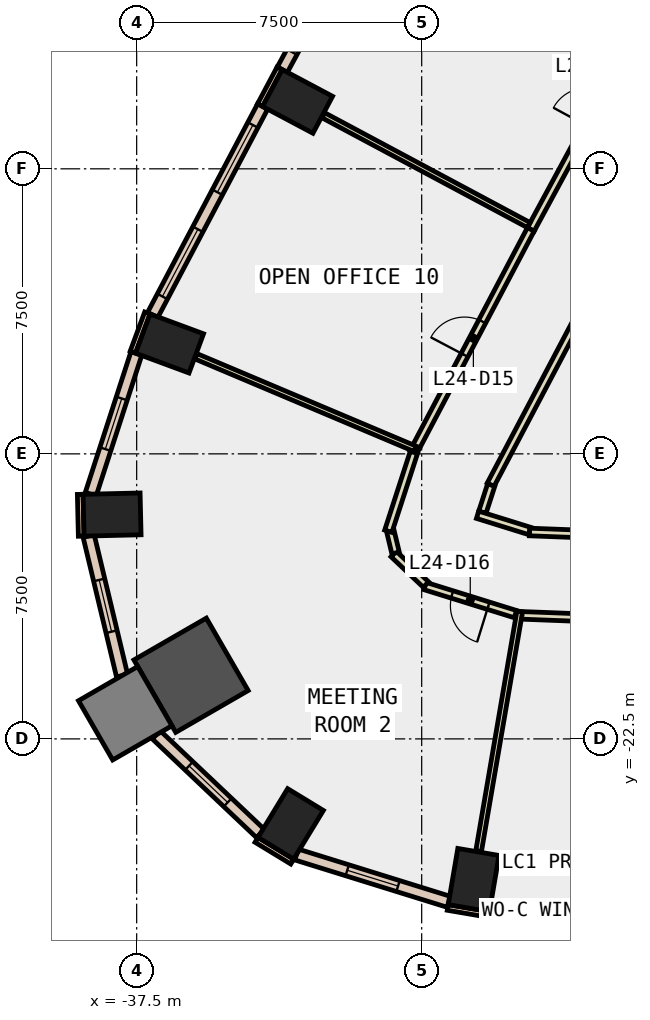
"""IFC4 building model, lengths in metres.
Left out: names, types, materials, properties, quantities, classifications, styles, units other than length and angle.
Written with IfcOpenShell. Run it as: python <this file> out.ifc"""

import sys

from ifc_helpers import new_model, si_unit, direction, frame, frame_2d, origin, origin_2d, place, context, subcontext, project, spatial, rectangle, extrude, element, fill, save


model = new_model("IFC4")
c1 = context("Model", 3, precision=1e-05, world=origin(), true_north=direction((0.0, 1.0)))
c2 = subcontext(c1, "Body", "Model", "MODEL_VIEW")
j1 = project(units=[si_unit("LENGTHUNIT", "METRE"), si_unit("PLANEANGLEUNIT", "RADIAN")], contexts=[c1])
p1 = place(None, origin())
s1 = spatial("IfcSite", under=j1, at=p1, CompositionType="ELEMENT")
p2 = place(p1, origin())
s2 = spatial("IfcBuilding", under=s1, at=p2, CompositionType="ELEMENT")
p3 = place(p2, frame((0.0, 0.0, 111.8)))
s3 = spatial("IfcBuildingStorey", under=s2, at=p3, CompositionType="ELEMENT", Elevation=111.8)
for number, where, z_axis, x_axis in (
    (1, (-28.633, -26.214, -0.4), (0.0, 0.0, 1.0), (-0.986, 0.168, 0.0)),
    (2, (-33.266, -5.726, -0.4), (0.0, 0.0, 1.0), (0.469, 0.883, 0.0)),
    (3, (-36.635, -12.096, -0.4), (0.0, 0.0, 1.0), (0.347, 0.938, 0.0)),
    (4, (-38.147, -16.597, -0.4), (0.0, 0.0, 1.0), (-0.023, 1.0, 0.0)),
):
    element("IfcColumn", number, at=place(p3, frame(where, z_axis=z_axis, x_axis=x_axis)), inside=s3, PredefinedType="COLUMN", context=c2, shape_type="SweptSolid", body=[
        extrude(rectangle(XDim=1.1, YDim=1.5, at=origin_2d()), origin(), (0.0, 0.0, 1.0), 4.2),
    ])
p4 = place(p3, frame((-36.069, -20.825, -0.4), z_axis=(0.0, 0.0, 1.0), x_axis=(0.866025403784, 0.5, 0.0)))
e5 = element("IfcColumn", 5, at=p4, inside=s3, PredefinedType="COLUMN", context=c2, shape_type="SweptSolid", body=[
    extrude(rectangle(XDim=2.2, YDim=2.2, at=origin_2d()), origin(), (0.0, 0.0, 1.0), 4.2),
])
p5 = place(p3, frame((-33.447, -24.737, -0.4), z_axis=(0.0, 0.0, 1.0), x_axis=(-0.854095929175, 0.520115510024, 0.0)))
e6 = element("IfcColumn", 6, at=p5, inside=s3, PredefinedType="COLUMN", context=c2, shape_type="SweptSolid", body=[
    extrude(rectangle(XDim=1.1, YDim=1.5, at=origin_2d()), origin(), (0.0, 0.0, 1.0), 4.2),
])
p6 = place(p3, frame((-37.801, -21.825, -0.4), z_axis=(0.0, 0.0, 1.0), x_axis=(0.866025403784, 0.5, 0.0)))
e7 = element("IfcColumn", 7, at=p6, inside=s3, PredefinedType="COLUMN", context=c2, shape_type="SweptSolid", body=[
    extrude(rectangle(XDim=1.8, YDim=1.8, at=origin_2d()), origin(), (0.0, 0.0, 1.0), 4.2),
])
p7 = place(p3, frame((-33.737, -4.854, 0.0), z_axis=(0.0, 0.0, 1.0), x_axis=(-0.46919310775, -0.883095593716, 0.0)))
e8 = element("IfcWall", 8, at=p7, inside=s3, PredefinedType="STANDARD", context=c2, shape_type="SweptSolid", body=[
    extrude(rectangle(XDim=1.099, YDim=0.15, at=frame_2d((0.55, 0.0))), origin(), (0.0, 0.0, 1.0), 3.8),
])
p8 = place(p3, frame((-37.218, -11.293, 0.0), z_axis=(0.0, 0.0, 1.0), x_axis=(-0.347205967468, -0.937788897436, 0.0)))
e9 = element("IfcWall", 9, at=p8, inside=s3, PredefinedType="STANDARD", context=c2, shape_type="SweptSolid", body=[
    extrude(rectangle(XDim=1.1, YDim=0.15, at=frame_2d((0.55, 0.0))), origin(), (0.0, 0.0, 1.0), 3.8),
])
p9 = place(p3, frame((-29.314, -26.935, 0.0), z_axis=(0.0, 0.0, 1.0), x_axis=(0.985763338892, -0.168138751323, 0.0)))
e10 = element("IfcWall", 10, at=p9, inside=s3, PredefinedType="STANDARD", context=c2, shape_type="SweptSolid", body=[
    extrude(rectangle(XDim=1.101, YDim=0.15, at=frame_2d((0.55, 0.0))), origin(), (0.0, 0.0, 1.0), 3.8),
])
for number, where, z_axis, x_axis in (
    (11, (-38.985, -16.066, 0.0), (0.0, 0.0, 1.0), (0.024, -1.0, 0.0)),
    (12, (-34.346, -25.156, 0.0), (0.0, 0.0, 1.0), (0.854, -0.52, 0.0)),
):
    element("IfcWall", number, at=place(p3, frame(where, z_axis=z_axis, x_axis=x_axis)), inside=s3, PredefinedType="STANDARD", context=c2, shape_type="SweptSolid", body=[
        extrude(rectangle(XDim=1.1, YDim=0.15, at=frame_2d((0.55, 0.0))), origin(), (0.0, 0.0, 1.0), 3.8),
    ])
p10 = place(p3, frame((-28.205, -26.973, 0.0), z_axis=(0.0, 0.0, 1.0), x_axis=(0.999266319694, -0.03829911651, 0.0)))
e13 = element("IfcWall", 13, at=p10, inside=s3, PredefinedType="STANDARD", context=c2, shape_type="SweptSolid", body=[
    extrude(rectangle(XDim=5.877, YDim=0.3, at=frame_2d((2.939, 0.0))), origin(), (0.0, 0.0, 1.0), 3.8),
])
p11 = place(p10, frame((0.469, 0.0, 0.9)))
e14 = element("IfcOpeningElement", 14, at=p11, cuts=e13, PredefinedType="OPENING", context=c2, shape_type="SweptSolid", body=[
    extrude(rectangle(XDim=2.0, YDim=2.6, at=frame_2d((1.0, 1.3))), frame((0.0, 0.16, 0.0), z_axis=(0.0, -1.0, 0.0), x_axis=(1.0, 0.0, 0.0)), (0.0, 0.0, 1.0), 0.32),
])
p12 = place(p10, frame((3.408, 0.0, 0.9)))
e15 = element("IfcOpeningElement", 15, at=p12, cuts=e13, PredefinedType="OPENING", context=c2, shape_type="SweptSolid", body=[
    extrude(rectangle(XDim=2.0, YDim=2.6, at=frame_2d((1.0, 1.3))), frame((0.0, 0.16, 0.0), z_axis=(0.0, -1.0, 0.0), x_axis=(1.0, 0.0, 0.0)), (0.0, 0.0, 1.0), 0.32),
])
p13 = place(p3, frame((-30.758, 0.481, 0.0), z_axis=(0.0, 0.0, 1.0), x_axis=(-0.476097776444, -0.879392351152, 0.0)))
e16 = element("IfcWall", 16, at=p13, inside=s3, PredefinedType="STANDARD", context=c2, shape_type="SweptSolid", body=[
    extrude(rectangle(XDim=6.11, YDim=0.3, at=frame_2d((3.055, 0.0))), origin(), (0.0, 0.0, 1.0), 3.8),
])
p14 = place(p13, frame((0.527, 0.0, 0.9)))
e17 = element("IfcOpeningElement", 17, at=p14, cuts=e16, PredefinedType="OPENING", context=c2, shape_type="SweptSolid", body=[
    extrude(rectangle(XDim=2.0, YDim=2.6, at=frame_2d((1.0, 1.3))), frame((0.0, 0.16, 0.0), z_axis=(0.0, -1.0, 0.0), x_axis=(1.0, 0.0, 0.0)), (0.0, 0.0, 1.0), 0.32),
])
p15 = place(p13, frame((3.582, 0.0, 0.9)))
e18 = element("IfcOpeningElement", 18, at=p15, cuts=e16, PredefinedType="OPENING", context=c2, shape_type="SweptSolid", body=[
    extrude(rectangle(XDim=2.0, YDim=2.6, at=frame_2d((1.0, 1.3))), frame((0.0, 0.16, 0.0), z_axis=(0.0, -1.0, 0.0), x_axis=(1.0, 0.0, 0.0)), (0.0, 0.0, 1.0), 0.32),
])
p16 = place(p3, frame((-34.185, -5.86, 0.0), z_axis=(0.0, 0.0, 1.0), x_axis=(-0.466599547852, -0.88446868907, 0.0)))
e19 = element("IfcWall", 19, at=p16, inside=s3, PredefinedType="STANDARD", context=c2, shape_type="SweptSolid", body=[
    extrude(rectangle(XDim=6.202, YDim=0.3, at=frame_2d((3.101, 0.0))), origin(), (0.0, 0.0, 1.0), 3.8),
])
p17 = place(p16, frame((0.551, 0.0, 0.9)))
e20 = element("IfcOpeningElement", 20, at=p17, cuts=e19, PredefinedType="OPENING", context=c2, shape_type="SweptSolid", body=[
    extrude(rectangle(XDim=2.0, YDim=2.6, at=frame_2d((1.0, 1.3))), frame((0.0, 0.16, 0.0), z_axis=(0.0, -1.0, 0.0), x_axis=(1.0, 0.0, 0.0)), (0.0, 0.0, 1.0), 0.32),
])
p18 = place(p16, frame((3.652, 0.0, 0.9)))
e21 = element("IfcOpeningElement", 21, at=p18, cuts=e19, PredefinedType="OPENING", context=c2, shape_type="SweptSolid", body=[
    extrude(rectangle(XDim=2.0, YDim=2.6, at=frame_2d((1.0, 1.3))), frame((0.0, 0.16, 0.0), z_axis=(0.0, -1.0, 0.0), x_axis=(1.0, 0.0, 0.0)), (0.0, 0.0, 1.0), 0.32),
])
p19 = place(p3, frame((-37.508, -12.358, 0.0), z_axis=(0.0, 0.0, 1.0), x_axis=(-0.308484760821, -0.951229284842, 0.0)))
e22 = element("IfcWall", 22, at=p19, inside=s3, PredefinedType="STANDARD", context=c2, shape_type="SweptSolid", body=[
    extrude(rectangle(XDim=3.893, YDim=0.3, at=frame_2d((1.947, 0.0))), origin(), (0.0, 0.0, 1.0), 3.8),
])
p20 = place(p19, frame((1.246, 0.0, 0.9)))
e23 = element("IfcOpeningElement", 23, at=p20, cuts=e22, PredefinedType="OPENING", context=c2, shape_type="SweptSolid", body=[
    extrude(rectangle(XDim=1.4, YDim=2.6, at=frame_2d((0.7, 1.3))), frame((0.0, 0.16, 0.0), z_axis=(0.0, -1.0, 0.0), x_axis=(1.0, 0.0, 0.0)), (0.0, 0.0, 1.0), 0.32),
])
p21 = place(p3, frame((-38.763, -17.161, 0.0), z_axis=(0.0, 0.0, 1.0), x_axis=(0.232654276823, -0.972559503309, 0.0)))
e24 = element("IfcWall", 24, at=p21, inside=s3, PredefinedType="STANDARD", context=c2, shape_type="SweptSolid", body=[
    extrude(rectangle(XDim=3.778, YDim=0.3, at=frame_2d((1.889, 0.0))), origin(), (0.0, 0.0, 1.0), 3.8),
])
p22 = place(p21, frame((1.189, 0.0, 0.9)))
e25 = element("IfcOpeningElement", 25, at=p22, cuts=e24, PredefinedType="OPENING", context=c2, shape_type="SweptSolid", body=[
    extrude(rectangle(XDim=1.4, YDim=2.6, at=frame_2d((0.7, 1.3))), frame((0.0, 0.16, 0.0), z_axis=(0.0, -1.0, 0.0), x_axis=(1.0, 0.0, 0.0)), (0.0, 0.0, 1.0), 0.32),
])
p23 = place(p3, frame((-36.985, -22.392, 0.0), z_axis=(0.0, 0.0, 1.0), x_axis=(0.726076674532, -0.687613745281, 0.0)))
e26 = element("IfcWall", 26, at=p23, inside=s3, PredefinedType="STANDARD", context=c2, shape_type="SweptSolid", body=[
    extrude(rectangle(XDim=3.777, YDim=0.3, at=frame_2d((1.888, 0.0))), origin(), (0.0, 0.0, 1.0), 3.8),
])
p24 = place(p23, frame((1.188, 0.0, 0.9)))
e27 = element("IfcOpeningElement", 27, at=p24, cuts=e26, PredefinedType="OPENING", context=c2, shape_type="SweptSolid", body=[
    extrude(rectangle(XDim=1.4, YDim=2.6, at=frame_2d((0.7, 1.3))), frame((0.0, 0.16, 0.0), z_axis=(0.0, -1.0, 0.0), x_axis=(1.0, 0.0, 0.0)), (0.0, 0.0, 1.0), 0.32),
])
p25 = place(p3, frame((-33.294, -25.542, 0.0), z_axis=(0.0, 0.0, 1.0), x_axis=(0.954955020021, -0.296750585066, 0.0)))
e28 = element("IfcWall", 28, at=p25, inside=s3, PredefinedType="STANDARD", context=c2, shape_type="SweptSolid", body=[
    extrude(rectangle(XDim=4.196, YDim=0.3, at=frame_2d((2.098, 0.0))), origin(), (0.0, 0.0, 1.0), 3.8),
])
p26 = place(p25, frame((1.398, 0.0, 0.9)))
e29 = element("IfcOpeningElement", 29, at=p26, cuts=e28, PredefinedType="OPENING", context=c2, shape_type="SweptSolid", body=[
    extrude(rectangle(XDim=1.4, YDim=2.6, at=frame_2d((0.7, 1.3))), frame((0.0, 0.16, 0.0), z_axis=(0.0, -1.0, 0.0), x_axis=(1.0, 0.0, 0.0)), (0.0, 0.0, 1.0), 0.32),
])
p27 = place(p3, frame((-25.153, -10.065, 0.0), z_axis=(0.0, 0.0, 1.0), x_axis=(-0.466663976618, -0.884434696813, 0.0)))
e30 = element("IfcWall", 30, at=p27, inside=s3, PredefinedType="PARTITIONING", context=c2, shape_type="SweptSolid", body=[
    extrude(rectangle(XDim=6.501, YDim=0.2, at=frame_2d((3.25, 0.0))), origin(), (0.0, 0.0, 1.0), 3.8),
])
p28 = place(p3, frame((-28.171, -15.821, 0.0), z_axis=(0.0, 0.0, 1.0), x_axis=(-0.308053137273, -0.951369152651, 0.0)))
e31 = element("IfcWall", 31, at=p28, inside=s3, PredefinedType="PARTITIONING", context=c2, shape_type="SweptSolid", body=[
    extrude(rectangle(XDim=0.754, YDim=0.2, at=frame_2d((0.377, 0.0))), origin(), (0.0, 0.0, 1.0), 3.8),
])
p29 = place(p3, frame((-28.529, -16.603, 0.0), z_axis=(0.0, 0.0, 1.0), x_axis=(0.954829998701, -0.297152609916, 0.0)))
e32 = element("IfcWall", 32, at=p29, inside=s3, PredefinedType="PARTITIONING", context=c2, shape_type="SweptSolid", body=[
    extrude(rectangle(XDim=1.437, YDim=0.2, at=frame_2d((0.719, 0.0))), origin(), (0.0, 0.0, 1.0), 3.8),
])
p30 = place(p3, frame((-27.162, -17.056, 0.0), z_axis=(0.0, 0.0, 1.0), x_axis=(0.999270868304, -0.038180253525, 0.0)))
e33 = element("IfcWall", 33, at=p30, inside=s3, PredefinedType="PARTITIONING", context=c2, shape_type="SweptSolid", body=[
    extrude(rectangle(XDim=5.71, YDim=0.2, at=frame_2d((2.855, 0.0))), origin(), (0.0, 0.0, 1.0), 3.8),
])
p31 = place(p3, frame((-27.129, -9.094, 0.0), z_axis=(0.0, 0.0, 1.0), x_axis=(0.476090835435, 0.879396108938, 0.0)))
e34 = element("IfcWall", 34, at=p31, inside=s3, PredefinedType="PARTITIONING", context=c2, shape_type="SweptSolid", body=[
    extrude(rectangle(XDim=7.198, YDim=0.2, at=frame_2d((3.599, 0.0))), origin(), (0.0, 0.0, 1.0), 3.8),
])
p32 = place(p31, frame((3.099, 0.0, 0.0)))
e35 = element("IfcOpeningElement", 35, at=p32, cuts=e34, PredefinedType="OPENING", context=c2, shape_type="SweptSolid", body=[
    extrude(rectangle(XDim=1.0, YDim=2.1, at=frame_2d((0.5, 1.05))), frame((0.0, 0.11, 0.0), z_axis=(0.0, -1.0, 0.0), x_axis=(1.0, 0.0, 0.0)), (0.0, 0.0, 1.0), 0.22),
])
p33 = place(p3, frame((-30.221, -14.956, 0.0), z_axis=(0.0, 0.0, 1.0), x_axis=(0.466543318111, 0.884498350663, 0.0)))
e36 = element("IfcWall", 36, at=p33, inside=s3, PredefinedType="PARTITIONING", context=c2, shape_type="SweptSolid", body=[
    extrude(rectangle(XDim=6.627, YDim=0.2, at=frame_2d((3.314, 0.0))), origin(), (0.0, 0.0, 1.0), 3.8),
])
p34 = place(p33, frame((2.889, 0.0, 0.0)))
e37 = element("IfcOpeningElement", 37, at=p34, cuts=e36, PredefinedType="OPENING", context=c2, shape_type="SweptSolid", body=[
    extrude(rectangle(XDim=1.0, YDim=2.1, at=frame_2d((0.5, 1.05))), frame((0.0, 0.11, 0.0), z_axis=(0.0, -1.0, 0.0), x_axis=(1.0, 0.0, 0.0)), (0.0, 0.0, 1.0), 0.22),
])
p35 = place(p3, frame((-27.533, -19.217, 0.0), z_axis=(0.0, 0.0, 1.0), x_axis=(-0.954946345159, 0.296778499671, 0.0)))
e38 = element("IfcWall", 38, at=p35, inside=s3, PredefinedType="PARTITIONING", context=c2, shape_type="SweptSolid", body=[
    extrude(rectangle(XDim=2.49, YDim=0.2, at=frame_2d((1.245, 0.0))), origin(), (0.0, 0.0, 1.0), 3.8),
])
p36 = place(p35, frame((0.745, 0.0, 0.0)))
e39 = element("IfcOpeningElement", 39, at=p36, cuts=e38, PredefinedType="OPENING", context=c2, shape_type="SweptSolid", body=[
    extrude(rectangle(XDim=1.0, YDim=2.1, at=frame_2d((0.5, 1.05))), frame((0.0, 0.11, 0.0), z_axis=(0.0, -1.0, 0.0), x_axis=(1.0, 0.0, 0.0)), (0.0, 0.0, 1.0), 0.22),
])
p37 = place(p3, frame((-29.888, -18.439, 0.0), z_axis=(0.0, 0.0, 1.0), x_axis=(-0.726155646563, 0.687530346214, 0.0)))
e40 = element("IfcWall", 40, at=p37, inside=s3, PredefinedType="PARTITIONING", context=c2, shape_type="SweptSolid", body=[
    extrude(rectangle(XDim=1.169, YDim=0.2, at=frame_2d((0.585, 0.0))), origin(), (0.0, 0.0, 1.0), 3.8),
])
p38 = place(p3, frame((-30.687, -17.607, 0.0), z_axis=(0.0, 0.0, 1.0), x_axis=(-0.232504544059, 0.972595309978, 0.0)))
e41 = element("IfcWall", 41, at=p38, inside=s3, PredefinedType="PARTITIONING", context=c2, shape_type="SweptSolid", body=[
    extrude(rectangle(XDim=0.585, YDim=0.2, at=frame_2d((0.292, 0.0))), origin(), (0.0, 0.0, 1.0), 3.8),
])
p39 = place(p3, frame((-30.878, -17.036, 0.0), z_axis=(0.0, 0.0, 1.0), x_axis=(0.308592319841, 0.951194396606, 0.0)))
e42 = element("IfcWall", 42, at=p39, inside=s3, PredefinedType="PARTITIONING", context=c2, shape_type="SweptSolid", body=[
    extrude(rectangle(XDim=2.18, YDim=0.2, at=frame_2d((1.09, 0.0))), origin(), (0.0, 0.0, 1.0), 3.8),
])
p40 = place(p3, frame((-21.529, -19.473, 0.0), z_axis=(0.0, 0.0, 1.0), x_axis=(-0.999270076349, 0.038200975307, 0.0)))
e43 = element("IfcWall", 43, at=p40, inside=s3, PredefinedType="PARTITIONING", context=c2, shape_type="SweptSolid", body=[
    extrude(rectangle(XDim=5.937, YDim=0.2, at=frame_2d((2.969, 0.0))), origin(), (0.0, 0.0, 1.0), 3.8),
])
p41 = place(p40, frame((2.469, 0.0, 0.0)))
e44 = element("IfcOpeningElement", 44, at=p41, cuts=e43, PredefinedType="OPENING", context=c2, shape_type="SweptSolid", body=[
    extrude(rectangle(XDim=1.0, YDim=2.1, at=frame_2d((0.5, 1.05))), frame((0.0, 0.11, 0.0), z_axis=(0.0, -1.0, 0.0), x_axis=(1.0, 0.0, 0.0)), (0.0, 0.0, 1.0), 0.22),
])
p42 = place(p3, frame((-27.182, -8.981, 0.0), z_axis=(0.0, 0.0, 1.0), x_axis=(-0.881899408669, 0.471437623647, 0.0)))
e45 = element("IfcWall", 45, at=p42, inside=s3, PredefinedType="PARTITIONING", context=c2, shape_type="SweptSolid", body=[
    extrude(rectangle(XDim=6.13, YDim=0.15, at=frame_2d((3.065, 0.0))), origin(), (0.0, 0.0, 1.0), 3.8),
])
p43 = place(p3, frame((-30.174, -14.867, 0.0), z_axis=(0.0, 0.0, 1.0), x_axis=(-0.921262609517, 0.388941132185, 0.0)))
e46 = element("IfcWall", 46, at=p43, inside=s3, PredefinedType="PARTITIONING", context=c2, shape_type="SweptSolid", body=[
    extrude(rectangle(XDim=6.258, YDim=0.15, at=frame_2d((3.129, 0.0))), origin(), (0.0, 0.0, 1.0), 3.8),
])
p44 = place(p3, frame((-27.42, -19.148, 0.0), z_axis=(0.0, 0.0, 1.0), x_axis=(-0.169086648341, -0.985601189809, 0.0)))
e47 = element("IfcWall", 47, at=p44, inside=s3, PredefinedType="PARTITIONING", context=c2, shape_type="SweptSolid", body=[
    extrude(rectangle(XDim=6.399, YDim=0.15, at=frame_2d((3.2, 0.0))), origin(), (0.0, 0.0, 1.0), 3.8),
])
p45 = place(p11, origin())
e48 = element("IfcWindow", 48, at=p45, inside=s3, PartitioningType="SINGLE_PANEL", PredefinedType="WINDOW", context=c2, shape_type="SweptSolid", body=[
    extrude(rectangle(XDim=2.0, YDim=2.6, at=frame_2d((1.0, 1.3))), frame((0.0, 0.03, 0.0), z_axis=(0.0, -1.0, 0.0), x_axis=(1.0, 0.0, 0.0)), (0.0, 0.0, 1.0), 0.06),
])
fill(e14, e48)
p46 = place(p17, origin())
e49 = element("IfcWindow", 49, at=p46, inside=s3, PartitioningType="SINGLE_PANEL", PredefinedType="WINDOW", context=c2, shape_type="SweptSolid", body=[
    extrude(rectangle(XDim=2.0, YDim=2.6, at=frame_2d((1.0, 1.3))), frame((0.0, 0.03, 0.0), z_axis=(0.0, -1.0, 0.0), x_axis=(1.0, 0.0, 0.0)), (0.0, 0.0, 1.0), 0.06),
])
fill(e20, e49)
p47 = place(p18, origin())
e50 = element("IfcWindow", 50, at=p47, inside=s3, PartitioningType="SINGLE_PANEL", PredefinedType="WINDOW", context=c2, shape_type="SweptSolid", body=[
    extrude(rectangle(XDim=2.0, YDim=2.6, at=frame_2d((1.0, 1.3))), frame((0.0, 0.03, 0.0), z_axis=(0.0, -1.0, 0.0), x_axis=(1.0, 0.0, 0.0)), (0.0, 0.0, 1.0), 0.06),
])
fill(e21, e50)
p48 = place(p20, origin())
e51 = element("IfcWindow", 51, at=p48, inside=s3, PartitioningType="SINGLE_PANEL", PredefinedType="WINDOW", context=c2, shape_type="SweptSolid", body=[
    extrude(rectangle(XDim=1.4, YDim=2.6, at=frame_2d((0.7, 1.3))), frame((0.0, 0.03, 0.0), z_axis=(0.0, -1.0, 0.0), x_axis=(1.0, 0.0, 0.0)), (0.0, 0.0, 1.0), 0.06),
])
fill(e23, e51)
p49 = place(p22, origin())
e52 = element("IfcWindow", 52, at=p49, inside=s3, PartitioningType="SINGLE_PANEL", PredefinedType="WINDOW", context=c2, shape_type="SweptSolid", body=[
    extrude(rectangle(XDim=1.4, YDim=2.6, at=frame_2d((0.7, 1.3))), frame((0.0, 0.03, 0.0), z_axis=(0.0, -1.0, 0.0), x_axis=(1.0, 0.0, 0.0)), (0.0, 0.0, 1.0), 0.06),
])
fill(e25, e52)
p50 = place(p24, origin())
e53 = element("IfcWindow", 53, at=p50, inside=s3, PartitioningType="SINGLE_PANEL", PredefinedType="WINDOW", context=c2, shape_type="SweptSolid", body=[
    extrude(rectangle(XDim=1.4, YDim=2.6, at=frame_2d((0.7, 1.3))), frame((0.0, 0.03, 0.0), z_axis=(0.0, -1.0, 0.0), x_axis=(1.0, 0.0, 0.0)), (0.0, 0.0, 1.0), 0.06),
])
fill(e27, e53)
p51 = place(p26, origin())
e54 = element("IfcWindow", 54, at=p51, inside=s3, PartitioningType="SINGLE_PANEL", PredefinedType="WINDOW", context=c2, shape_type="SweptSolid", body=[
    extrude(rectangle(XDim=1.4, YDim=2.6, at=frame_2d((0.7, 1.3))), frame((0.0, 0.03, 0.0), z_axis=(0.0, -1.0, 0.0), x_axis=(1.0, 0.0, 0.0)), (0.0, 0.0, 1.0), 0.06),
])
fill(e29, e54)
p52 = place(p34, origin())
e55 = element("IfcDoor", 55, at=p52, inside=s3, OperationType="SINGLE_SWING_LEFT", PredefinedType="DOOR", context=c2, shape_type="SweptSolid", body=[
    extrude(rectangle(XDim=1.0, YDim=2.1, at=frame_2d((0.5, 1.05))), frame((0.0, 0.025, 0.0), z_axis=(0.0, -1.0, 0.0), x_axis=(1.0, 0.0, 0.0)), (0.0, 0.0, 1.0), 0.05),
])
fill(e37, e55)
p53 = place(p36, origin())
e56 = element("IfcDoor", 56, at=p53, inside=s3, OperationType="SINGLE_SWING_LEFT", PredefinedType="DOOR", context=c2, shape_type="SweptSolid", body=[
    extrude(rectangle(XDim=1.0, YDim=2.1, at=frame_2d((0.5, 1.05))), frame((0.0, 0.025, 0.0), z_axis=(0.0, -1.0, 0.0), x_axis=(1.0, 0.0, 0.0)), (0.0, 0.0, 1.0), 0.05),
])
fill(e39, e56)
save(model, sys.argv[1])
